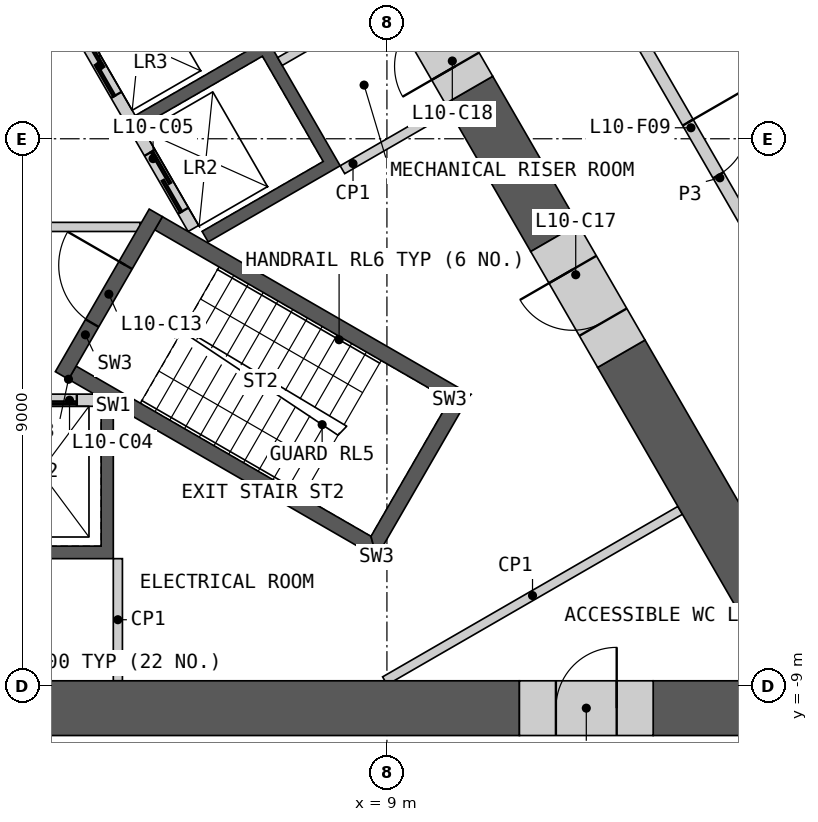
"""IFC4 building model, lengths in metres.
Left out: names, types, materials, properties, quantities, classifications, styles, units other than length and angle.
Written with IfcOpenShell. Run it as: python <this file> out.ifc"""

import sys

from ifc_helpers import new_model, si_unit, direction, frame, frame_2d, origin, place, context, subcontext, project, spatial, polyline, rectangle, outline, extrude, element, fill, save


model = new_model("IFC4")
c1 = context("Model", 3, precision=1e-05, world=origin(), true_north=direction((0.0, 1.0)))
c2 = subcontext(c1, "Body", "Model", "MODEL_VIEW")
j1 = project(units=[si_unit("LENGTHUNIT", "METRE"), si_unit("PLANEANGLEUNIT", "RADIAN")], contexts=[c1])
p1 = place(None, origin())
s1 = spatial("IfcSite", under=j1, at=p1, CompositionType="ELEMENT")
p2 = place(p1, origin())
s2 = spatial("IfcBuilding", under=s1, at=p2, CompositionType="ELEMENT")
p3 = place(p2, frame((0.0, 0.0, 51.0)))
s3 = spatial("IfcBuildingStorey", under=s2, at=p3, CompositionType="ELEMENT", Elevation=51.0)
p4 = place(p3, origin())
e1 = element("IfcWall", 1, at=p4, inside=s3, PredefinedType="SHEAR", context=c2, shape_type="SweptSolid", body=[
    extrude(outline(polyline([(4.5, -4.4), (4.5, -6.906), (-4.5, -6.906), (-4.5, -4.4), (-4.3, -4.4), (-4.3, -6.7), (-2.3, -6.7), (-2.3, -4.4), (-2.1, -4.4), (-2.1, -6.7), (-0.1, -6.7), (-0.1, -4.4), (0.1, -4.4), (0.1, -6.7), (2.1, -6.7), (2.1, -4.4), (2.3, -4.4), (2.3, -6.7), (4.3, -6.7), (4.3, -4.4), (4.5, -4.4)])), origin(), (0.0, 0.0, 1.0), 3.8),
])
p5 = place(p3, frame((-4.187, -4.3, 0.0), z_axis=(0.0, 0.0, 1.0), x_axis=(1.0, 0.0, 0.0)))
e2 = element("IfcWall", 2, at=p5, inside=s3, PredefinedType="SOLIDWALL", context=c2, shape_type="SweptSolid", body=[
    extrude(rectangle(XDim=8.373, YDim=0.2, at=frame_2d((4.187, 0.0))), origin(), (0.0, 0.0, 1.0), 3.8),
])
p6 = place(p5, frame((0.287, 0.0, 0.0)))
e3 = element("IfcOpeningElement", 3, at=p6, cuts=e2, PredefinedType="OPENING", context=c2, shape_type="SweptSolid", body=[
    extrude(rectangle(XDim=1.2, YDim=2.1, at=frame_2d((0.6, 1.05))), frame((0.0, 0.11, 0.0), z_axis=(0.0, -1.0, 0.0), x_axis=(1.0, 0.0, 0.0)), (0.0, 0.0, 1.0), 0.22),
])
p7 = place(p5, frame((2.387, 0.0, 0.0)))
e4 = element("IfcOpeningElement", 4, at=p7, cuts=e2, PredefinedType="OPENING", context=c2, shape_type="SweptSolid", body=[
    extrude(rectangle(XDim=1.4, YDim=2.1, at=frame_2d((0.7, 1.05))), frame((0.0, 0.11, 0.0), z_axis=(0.0, -1.0, 0.0), x_axis=(1.0, 0.0, 0.0)), (0.0, 0.0, 1.0), 0.22),
])
p8 = place(p5, frame((4.737, 0.0, 0.0)))
e5 = element("IfcOpeningElement", 5, at=p8, cuts=e2, PredefinedType="OPENING", context=c2, shape_type="SweptSolid", body=[
    extrude(rectangle(XDim=1.1, YDim=2.1, at=frame_2d((0.55, 1.05))), frame((0.0, 0.11, 0.0), z_axis=(0.0, -1.0, 0.0), x_axis=(1.0, 0.0, 0.0)), (0.0, 0.0, 1.0), 0.22),
])
p9 = place(p5, frame((6.887, 0.0, 0.0)))
e6 = element("IfcOpeningElement", 6, at=p9, cuts=e2, PredefinedType="OPENING", context=c2, shape_type="SweptSolid", body=[
    extrude(rectangle(XDim=1.2, YDim=2.1, at=frame_2d((0.6, 1.05))), frame((0.0, 0.11, 0.0), z_axis=(0.0, -1.0, 0.0), x_axis=(1.0, 0.0, 0.0)), (0.0, 0.0, 1.0), 0.22),
])
p10 = place(p3, origin())
e7 = element("IfcWall", 7, at=p10, inside=s3, PredefinedType="SHEAR", context=c2, shape_type="SweptSolid", body=[
    extrude(outline(polyline([(2.66, 4.192), (4.831, 5.445), (8.231, -0.444), (6.061, -1.697), (5.96, -1.524), (7.952, -0.374), (6.952, 1.358), (4.96, 0.208), (4.861, 0.381), (6.852, 1.531), (5.852, 3.263), (3.861, 2.113), (3.76, 2.287), (5.752, 3.437), (4.752, 5.169), (2.76, 4.019), (2.66, 4.192)])), origin(), (0.0, 0.0, 1.0), 3.8),
])
p11 = place(p3, frame((5.817, -1.476, 0.0), z_axis=(0.0, 0.0, 1.0), x_axis=(-0.500002616675, 0.866023893041, 0.0)))
e8 = element("IfcWall", 8, at=p11, inside=s3, PredefinedType="SOLIDWALL", context=c2, shape_type="SweptSolid", body=[
    extrude(rectangle(XDim=8.373, YDim=0.2, at=frame_2d((4.187, 0.0))), origin(), (0.0, 0.0, 1.0), 3.8),
])
p12 = place(p11, frame((0.337, 0.0, 0.0)))
e9 = element("IfcOpeningElement", 9, at=p12, cuts=e8, PredefinedType="OPENING", context=c2, shape_type="SweptSolid", body=[
    extrude(rectangle(XDim=1.1, YDim=2.1, at=frame_2d((0.55, 1.05))), frame((0.0, 0.11, 0.0), z_axis=(0.0, -1.0, 0.0), x_axis=(1.0, 0.0, 0.0)), (0.0, 0.0, 1.0), 0.22),
])
p13 = place(p11, frame((2.537, 0.0, 0.0)))
e10 = element("IfcOpeningElement", 10, at=p13, cuts=e8, PredefinedType="OPENING", context=c2, shape_type="SweptSolid", body=[
    extrude(rectangle(XDim=1.1, YDim=2.1, at=frame_2d((0.55, 1.05))), frame((0.0, 0.11, 0.0), z_axis=(0.0, -1.0, 0.0), x_axis=(1.0, 0.0, 0.0)), (0.0, 0.0, 1.0), 0.22),
])
p14 = place(p11, frame((4.737, 0.0, 0.0)))
e11 = element("IfcOpeningElement", 11, at=p14, cuts=e8, PredefinedType="OPENING", context=c2, shape_type="SweptSolid", body=[
    extrude(rectangle(XDim=1.1, YDim=2.1, at=frame_2d((0.55, 1.05))), frame((0.0, 0.11, 0.0), z_axis=(0.0, -1.0, 0.0), x_axis=(1.0, 0.0, 0.0)), (0.0, 0.0, 1.0), 0.22),
])
p15 = place(p11, frame((7.037, 0.0, 0.0)))
e12 = element("IfcOpeningElement", 12, at=p15, cuts=e8, PredefinedType="OPENING", context=c2, shape_type="SweptSolid", body=[
    extrude(rectangle(XDim=0.9, YDim=2.1, at=frame_2d((0.45, 1.05))), frame((0.0, 0.11, 0.0), z_axis=(0.0, -1.0, 0.0), x_axis=(1.0, 0.0, 0.0)), (0.0, 0.0, 1.0), 0.22),
])
p16 = place(p3, frame((-4.941, -1.45, 0.0), z_axis=(0.0, 0.0, 1.0), x_axis=(1.0, 0.0, 0.0)))
e13 = element("IfcWall", 13, at=p16, inside=s3, PredefinedType="PARTITIONING", context=c2, shape_type="SweptSolid", body=[
    extrude(rectangle(XDim=9.882, YDim=0.15, at=frame_2d((4.941, 0.0))), origin(), (0.0, 0.0, 1.0), 3.8),
])
p17 = place(p16, frame((4.391, 0.0, 0.0)))
e14 = element("IfcOpeningElement", 14, at=p17, cuts=e13, PredefinedType="OPENING", context=c2, shape_type="SweptSolid", body=[
    extrude(rectangle(XDim=1.1, YDim=2.1, at=frame_2d((0.55, 1.05))), frame((0.0, 0.085, 0.0), z_axis=(0.0, -1.0, 0.0), x_axis=(1.0, 0.0, 0.0)), (0.0, 0.0, 1.0), 0.17),
])
p18 = place(p3, origin())
e15 = element("IfcWall", 15, at=p18, inside=s3, PredefinedType="SHEAR", context=c2, shape_type="SweptSolid", body=[
    extrude(outline(polyline([(3.763, -3.956), (8.83, -6.881), (8.738, -6.539), (3.888, -3.739), (3.763, -3.956)])), origin(), (0.0, 0.0, 1.0), 3.8),
])
p19 = place(p3, origin())
e16 = element("IfcWall", 16, at=p19, inside=s3, PredefinedType="SHEAR", context=c2, shape_type="SweptSolid", body=[
    extrude(outline(polyline([(8.83, -6.881), (10.374, -4.206), (10.032, -4.298), (8.738, -6.539), (8.83, -6.881)])), origin(), (0.0, 0.0, 1.0), 3.8),
])
p20 = place(p3, origin())
e17 = element("IfcWall", 17, at=p20, inside=s3, PredefinedType="SHEAR", context=c2, shape_type="SweptSolid", body=[
    extrude(outline(polyline([(10.032, -4.298), (10.374, -4.206), (5.307, -1.281), (5.182, -1.498), (10.032, -4.298)])), origin(), (0.0, 0.0, 1.0), 3.8),
])
p21 = place(p3, frame((3.655, -3.893, 0.0), z_axis=(0.0, 0.0, 1.0), x_axis=(0.499982516597, 0.866035497597, 0.0)))
e18 = element("IfcWall", 18, at=p21, inside=s3, PredefinedType="SHEAR", context=c2, shape_type="SweptSolid", body=[
    extrude(rectangle(XDim=3.088, YDim=0.25, at=frame_2d((1.544, 0.0))), origin(), (0.0, 0.0, 1.0), 3.8),
])
p22 = place(p21, frame((0.994, 0.0, 0.0)))
e19 = element("IfcOpeningElement", 19, at=p22, cuts=e18, PredefinedType="OPENING", context=c2, shape_type="SweptSolid", body=[
    extrude(rectangle(XDim=1.1, YDim=2.1, at=frame_2d((0.55, 1.05))), frame((0.0, 0.135, 0.0), z_axis=(0.0, -1.0, 0.0), x_axis=(1.0, 0.0, 0.0)), (0.0, 0.0, 1.0), 0.27),
])
p23 = place(p3, frame((4.575, -6.906, 0.0), z_axis=(0.0, 0.0, 1.0), x_axis=(0.0, -1.0, 0.0)))
e20 = element("IfcWall", 20, at=p23, inside=s3, PredefinedType="PARTITIONING", context=c2, shape_type="SweptSolid", body=[
    extrude(rectangle(XDim=2.009, YDim=0.15, at=frame_2d((1.004, 0.0))), origin(), (0.0, 0.0, 1.0), 3.8),
])
p24 = place(p3, frame((8.268, -0.509, 0.0), z_axis=(0.0, 0.0, 1.0), x_axis=(0.866035824272, 0.499981950752, 0.0)))
e21 = element("IfcWall", 21, at=p24, inside=s3, PredefinedType="PARTITIONING", context=c2, shape_type="SweptSolid", body=[
    extrude(rectangle(XDim=2.009, YDim=0.15, at=frame_2d((1.004, 0.0))), origin(), (0.0, 0.0, 1.0), 3.8),
])
p25 = place(p3, frame((13.823, -6.111, 0.0), z_axis=(0.0, 0.0, 1.0), x_axis=(-0.866026802741, -0.499997576928, 0.0)))
e22 = element("IfcWall", 22, at=p25, inside=s3, PredefinedType="PARTITIONING", context=c2, shape_type="SweptSolid", body=[
    extrude(rectangle(XDim=5.607, YDim=0.15, at=frame_2d((2.804, 0.0))), origin(), (0.0, 0.0, 1.0), 3.8),
])
p26 = place(p3, frame((8.981, 2.275, 0.0), z_axis=(0.0, 0.0, 1.0), x_axis=(-0.866013584312, -0.500020471368, 0.0)))
e23 = element("IfcWall", 23, at=p26, inside=s3, PredefinedType="PARTITIONING", context=c2, shape_type="SweptSolid", body=[
    extrude(rectangle(XDim=2.009, YDim=0.15, at=frame_2d((1.005, 0.0))), origin(), (0.0, 0.0, 1.0), 3.8),
])
p27 = place(p3, frame((-4.371, -9.365, 0.0), z_axis=(0.0, 0.0, 1.0), x_axis=(1.0, 0.0, 0.0)))
e24 = element("IfcWall", 24, at=p27, inside=s3, PredefinedType="SHEAR", context=c2, shape_type="SweptSolid", body=[
    extrude(rectangle(XDim=15.55, YDim=0.9, at=frame_2d((7.775, 0.0))), origin(), (0.0, 0.0, 1.0), 3.8),
])
p28 = place(p3, frame((13.379, -9.365, 0.0), z_axis=(0.0, 0.0, 1.0), x_axis=(1.0, 0.0, 0.0)))
e25 = element("IfcWall", 25, at=p28, inside=s3, PredefinedType="SHEAR", context=c2, shape_type="SweptSolid", body=[
    extrude(rectangle(XDim=2.062, YDim=0.9, at=frame_2d((1.031, 0.0))), origin(), (0.0, 0.0, 1.0), 3.8),
])
p29 = place(p3, frame((15.831, -8.69, 0.0), z_axis=(0.0, 0.0, 1.0), x_axis=(-0.499999419053, 0.866025739194, 0.0)))
e26 = element("IfcWall", 26, at=p29, inside=s3, PredefinedType="SHEAR", context=c2, shape_type="SweptSolid", body=[
    extrude(rectangle(XDim=5.952, YDim=0.9, at=frame_2d((2.976, 0.0))), origin(), (0.0, 0.0, 1.0), 3.8),
])
p30 = place(p3, frame((11.755, -1.63, 0.0), z_axis=(0.0, 0.0, 1.0), x_axis=(-0.499943114462, 0.866058244174, 0.0)))
e27 = element("IfcWall", 27, at=p30, inside=s3, PredefinedType="SHEAR", context=c2, shape_type="SweptSolid", body=[
    extrude(rectangle(XDim=2.809, YDim=0.9, at=frame_2d((1.405, 0.0))), origin(), (0.0, 0.0, 1.0), 3.8),
])
p31 = place(p3, frame((11.179, -9.365, 0.0), z_axis=(0.0, 0.0, 1.0), x_axis=(1.0, 0.0, 0.0)))
e28 = element("IfcWall", 28, at=p31, inside=s3, PredefinedType="SHEAR", context=c2, shape_type="SweptSolid", body=[
    extrude(rectangle(XDim=2.2, YDim=0.9, at=frame_2d((1.1, 0.0))), origin(), (0.0, 0.0, 1.0), 3.8),
])
p32 = place(p31, frame((0.6, 0.0, 0.0)))
e29 = element("IfcOpeningElement", 29, at=p32, cuts=e28, PredefinedType="OPENING", context=c2, shape_type="SweptSolid", body=[
    extrude(rectangle(XDim=1.0, YDim=2.1, at=frame_2d((0.5, 1.05))), frame((0.0, 0.46, 0.0), z_axis=(0.0, -1.0, 0.0), x_axis=(1.0, 0.0, 0.0)), (0.0, 0.0, 1.0), 0.92),
])
p33 = place(p3, frame((12.855, -3.536, 0.0), z_axis=(0.0, 0.0, 1.0), x_axis=(-0.50002983664, 0.866008176907, 0.0)))
e30 = element("IfcWall", 30, at=p33, inside=s3, PredefinedType="SHEAR", context=c2, shape_type="SweptSolid", body=[
    extrude(rectangle(XDim=2.2, YDim=0.9, at=frame_2d((1.1, 0.0))), origin(), (0.0, 0.0, 1.0), 3.8),
])
p34 = place(p33, frame((0.6, 0.0, 0.0)))
e31 = element("IfcOpeningElement", 31, at=p34, cuts=e30, PredefinedType="OPENING", context=c2, shape_type="SweptSolid", body=[
    extrude(rectangle(XDim=1.0, YDim=2.1, at=frame_2d((0.5, 1.05))), frame((0.0, 0.46, 0.0), z_axis=(0.0, -1.0, 0.0), x_axis=(1.0, 0.0, 0.0)), (0.0, 0.0, 1.0), 0.92),
])
p35 = place(p3, frame((10.35, 0.803, 0.0), z_axis=(0.0, 0.0, 1.0), x_axis=(-0.500081290722, 0.865978465477, 0.0)))
e32 = element("IfcWall", 32, at=p35, inside=s3, PredefinedType="SHEAR", context=c2, shape_type="SweptSolid", body=[
    extrude(rectangle(XDim=1.865, YDim=0.9, at=frame_2d((0.933, 0.0))), origin(), (0.0, 0.0, 1.0), 3.8),
])
p36 = place(p35, frame((0.45, 0.0, 0.0)))
e33 = element("IfcOpeningElement", 33, at=p36, cuts=e32, PredefinedType="OPENING", context=c2, shape_type="SweptSolid", body=[
    extrude(rectangle(XDim=1.0, YDim=2.1, at=frame_2d((0.5, 1.05))), frame((0.0, 0.46, 0.0), z_axis=(0.0, -1.0, 0.0), x_axis=(1.0, 0.0, 0.0)), (0.0, 0.0, 1.0), 0.92),
])
p37 = place(p3, frame((10.719, 5.865, 0.0), z_axis=(0.0, 0.0, 1.0), x_axis=(0.49999175339, -0.866030164915, 0.0)))
e34 = element("IfcWall", 34, at=p37, inside=s3, PredefinedType="PARTITIONING", context=c2, shape_type="SweptSolid", body=[
    extrude(rectangle(XDim=10.019, YDim=0.2, at=frame_2d((5.009, 0.0))), origin(), (0.0, 0.0, 1.0), 3.8),
])
p38 = place(p37, frame((6.464, 0.0, 0.0)))
e35 = element("IfcOpeningElement", 35, at=p38, cuts=e34, PredefinedType="OPENING", context=c2, shape_type="SweptSolid", body=[
    extrude(rectangle(XDim=1.0, YDim=2.1, at=frame_2d((0.5, 1.05))), frame((0.0, 0.11, 0.0), z_axis=(0.0, -1.0, 0.0), x_axis=(1.0, 0.0, 0.0)), (0.0, 0.0, 1.0), 0.22),
])
p39 = place(p37, frame((1.753, 0.0, 0.0)))
e36 = element("IfcOpeningElement", 36, at=p39, cuts=e34, PredefinedType="OPENING", context=c2, shape_type="SweptSolid", body=[
    extrude(rectangle(XDim=1.0, YDim=2.1, at=frame_2d((0.5, 1.05))), frame((0.0, 0.11, 0.0), z_axis=(0.0, -1.0, 0.0), x_axis=(1.0, 0.0, 0.0)), (0.0, 0.0, 1.0), 0.22),
])
p40 = place(p9, origin())
e37 = element("IfcDoor", 37, at=p40, inside=s3, OperationType="SLIDING_TO_LEFT", PredefinedType="DOOR", context=c2, shape_type="SweptSolid", body=[
    extrude(rectangle(XDim=1.2, YDim=2.1, at=frame_2d((0.6, 1.05))), frame((0.0, 0.025, 0.0), z_axis=(0.0, -1.0, 0.0), x_axis=(1.0, 0.0, 0.0)), (0.0, 0.0, 1.0), 0.05),
])
fill(e6, e37)
p41 = place(p12, origin())
e38 = element("IfcDoor", 38, at=p41, inside=s3, OperationType="SLIDING_TO_LEFT", PredefinedType="DOOR", context=c2, shape_type="SweptSolid", body=[
    extrude(rectangle(XDim=1.1, YDim=2.1, at=frame_2d((0.55, 1.05))), frame((0.0, 0.025, 0.0), z_axis=(0.0, -1.0, 0.0), x_axis=(1.0, 0.0, 0.0)), (0.0, 0.0, 1.0), 0.05),
])
fill(e9, e38)
p42 = place(p13, origin())
e39 = element("IfcDoor", 39, at=p42, inside=s3, OperationType="SLIDING_TO_LEFT", PredefinedType="DOOR", context=c2, shape_type="SweptSolid", body=[
    extrude(rectangle(XDim=1.1, YDim=2.1, at=frame_2d((0.55, 1.05))), frame((0.0, 0.025, 0.0), z_axis=(0.0, -1.0, 0.0), x_axis=(1.0, 0.0, 0.0)), (0.0, 0.0, 1.0), 0.05),
])
fill(e10, e39)
p43 = place(p22, origin())
e40 = element("IfcDoor", 40, at=p43, inside=s3, OperationType="SINGLE_SWING_RIGHT", PredefinedType="DOOR", context=c2, shape_type="SweptSolid", body=[
    extrude(rectangle(XDim=1.1, YDim=2.1, at=frame_2d((0.55, 1.05))), frame((0.0, 0.025, 0.0), z_axis=(0.0, -1.0, 0.0), x_axis=(1.0, 0.0, 0.0)), (0.0, 0.0, 1.0), 0.05),
])
fill(e19, e40)
p44 = place(p32, origin())
e41 = element("IfcDoor", 41, at=p44, inside=s3, OperationType="SINGLE_SWING_RIGHT", PredefinedType="DOOR", context=c2, shape_type="SweptSolid", body=[
    extrude(rectangle(XDim=1.0, YDim=2.1, at=frame_2d((0.5, 1.05))), frame((0.0, 0.205, 0.0), z_axis=(0.0, -1.0, 0.0), x_axis=(1.0, 0.0, 0.0)), (0.0, 0.0, 1.0), 0.05),
])
fill(e29, e41)
p45 = place(p34, origin())
e42 = element("IfcDoor", 42, at=p45, inside=s3, OperationType="SINGLE_SWING_RIGHT", PredefinedType="DOOR", context=c2, shape_type="SweptSolid", body=[
    extrude(rectangle(XDim=1.0, YDim=2.1, at=frame_2d((0.5, 1.05))), frame((0.0, 0.205, 0.0), z_axis=(0.0, -1.0, 0.0), x_axis=(1.0, 0.0, 0.0)), (0.0, 0.0, 1.0), 0.05),
])
fill(e31, e42)
p46 = place(p36, origin())
e43 = element("IfcDoor", 43, at=p46, inside=s3, OperationType="SINGLE_SWING_LEFT", PredefinedType="DOOR", context=c2, shape_type="SweptSolid", body=[
    extrude(rectangle(XDim=1.0, YDim=2.1, at=frame_2d((0.5, 1.05))), frame((0.0, 0.205, 0.0), z_axis=(0.0, -1.0, 0.0), x_axis=(1.0, 0.0, 0.0)), (0.0, 0.0, 1.0), 0.05),
])
fill(e33, e43)
p47 = place(p38, origin())
e44 = element("IfcDoor", 44, at=p47, inside=s3, OperationType="SINGLE_SWING_LEFT", PredefinedType="DOOR", context=c2, shape_type="SweptSolid", body=[
    extrude(rectangle(XDim=1.0, YDim=2.1, at=frame_2d((0.5, 1.05))), frame((0.0, 0.025, 0.0), z_axis=(0.0, -1.0, 0.0), x_axis=(1.0, 0.0, 0.0)), (0.0, 0.0, 1.0), 0.05),
])
fill(e35, e44)
save(model, sys.argv[1])
